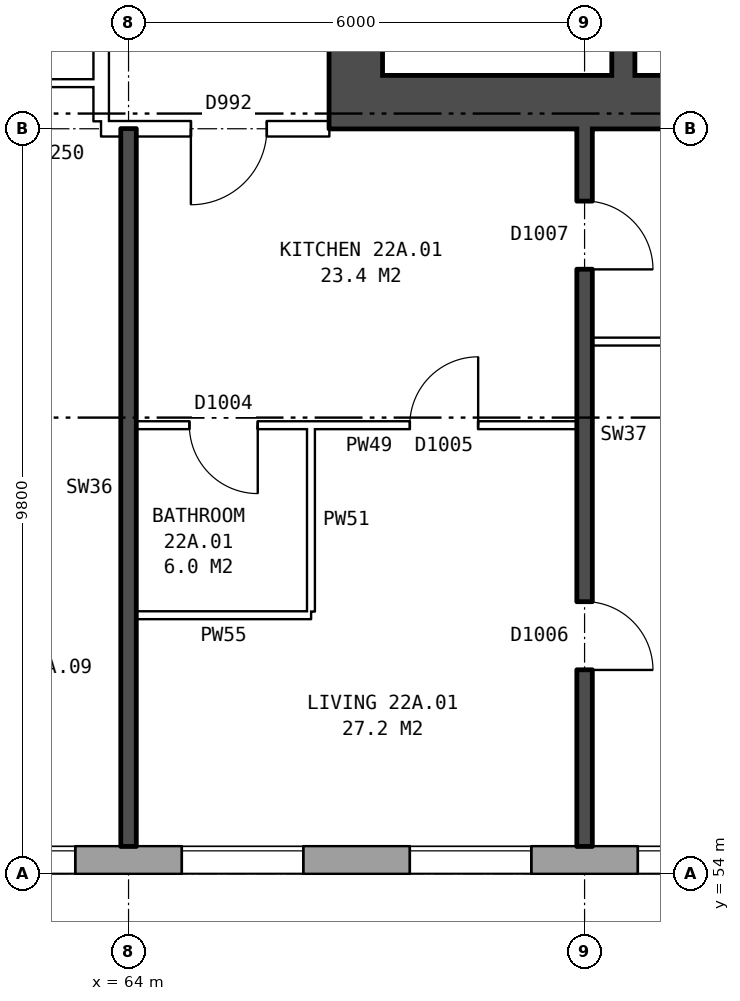
"""IFC4 building model, lengths in metres.
Left out: names, types, materials, properties, quantities, classifications, styles, units other than length and angle.
Written with IfcOpenShell. Run it as: python <this file> out.ifc"""

import sys

from ifc_helpers import new_model, si_unit, direction, frame, frame_2d, origin, place, context, subcontext, project, spatial, rectangle, extrude, element, fill, save


model = new_model("IFC4")
c1 = context("Model", 3, precision=1e-05, world=origin(), true_north=direction((0.0, 1.0)))
c2 = subcontext(c1, "Body", "Model", "MODEL_VIEW")
j1 = project(units=[si_unit("LENGTHUNIT", "METRE"), si_unit("PLANEANGLEUNIT", "RADIAN")], contexts=[c1])
p1 = place(None, origin())
s1 = spatial("IfcSite", under=j1, at=p1, CompositionType="ELEMENT")
p2 = place(p1, origin())
s2 = spatial("IfcBuilding", under=s1, at=p2, CompositionType="ELEMENT")
p3 = place(p2, frame((0.0, 0.0, 80.9)))
s3 = spatial("IfcBuildingStorey", under=s2, at=p3, CompositionType="ELEMENT", Elevation=80.9)
p4 = place(p3, frame((26.325, 54.18, 0.0), z_axis=(0.0, 0.0, 1.0), x_axis=(1.0, 0.0, 0.0)))
e1 = element("IfcWall", 1, at=p4, inside=s3, PredefinedType="STANDARD", context=c2, shape_type="SweptSolid", body=[
    extrude(rectangle(XDim=46.601, YDim=0.36, at=frame_2d((23.3, 0.0))), origin(), (0.0, 0.0, 1.0), 2.85),
])
p5 = place(p4, frame((2.375, 0.0, 0.8)))
e2 = element("IfcOpeningElement", 2, at=p5, cuts=e1, PredefinedType="OPENING", context=c2, shape_type="SweptSolid", body=[
    extrude(rectangle(XDim=1.6, YDim=1.8, at=frame_2d((0.8, 0.9))), frame((0.0, 0.19, 0.0), z_axis=(0.0, -1.0, 0.0), x_axis=(1.0, 0.0, 0.0)), (0.0, 0.0, 1.0), 0.38),
])
p6 = place(p4, frame((5.375, 0.0, 0.8)))
e3 = element("IfcOpeningElement", 3, at=p6, cuts=e1, PredefinedType="OPENING", context=c2, shape_type="SweptSolid", body=[
    extrude(rectangle(XDim=1.6, YDim=1.8, at=frame_2d((0.8, 0.9))), frame((0.0, 0.19, 0.0), z_axis=(0.0, -1.0, 0.0), x_axis=(1.0, 0.0, 0.0)), (0.0, 0.0, 1.0), 0.38),
])
p7 = place(p4, frame((8.375, 0.0, 0.8)))
e4 = element("IfcOpeningElement", 4, at=p7, cuts=e1, PredefinedType="OPENING", context=c2, shape_type="SweptSolid", body=[
    extrude(rectangle(XDim=1.6, YDim=1.8, at=frame_2d((0.8, 0.9))), frame((0.0, 0.19, 0.0), z_axis=(0.0, -1.0, 0.0), x_axis=(1.0, 0.0, 0.0)), (0.0, 0.0, 1.0), 0.38),
])
p8 = place(p4, frame((11.375, 0.0, 0.8)))
e5 = element("IfcOpeningElement", 5, at=p8, cuts=e1, PredefinedType="OPENING", context=c2, shape_type="SweptSolid", body=[
    extrude(rectangle(XDim=1.6, YDim=1.8, at=frame_2d((0.8, 0.9))), frame((0.0, 0.19, 0.0), z_axis=(0.0, -1.0, 0.0), x_axis=(1.0, 0.0, 0.0)), (0.0, 0.0, 1.0), 0.38),
])
p9 = place(p4, frame((15.875, 0.0, 0.8)))
e6 = element("IfcOpeningElement", 6, at=p9, cuts=e1, PredefinedType="OPENING", context=c2, shape_type="SweptSolid", body=[
    extrude(rectangle(XDim=1.2, YDim=1.2, at=frame_2d((0.6, 0.6))), frame((0.0, 0.19, 0.0), z_axis=(0.0, -1.0, 0.0), x_axis=(1.0, 0.0, 0.0)), (0.0, 0.0, 1.0), 0.38),
])
p10 = place(p4, frame((17.375, 0.0, 0.8)))
e7 = element("IfcOpeningElement", 7, at=p10, cuts=e1, PredefinedType="OPENING", context=c2, shape_type="SweptSolid", body=[
    extrude(rectangle(XDim=1.6, YDim=1.8, at=frame_2d((0.8, 0.9))), frame((0.0, 0.19, 0.0), z_axis=(0.0, -1.0, 0.0), x_axis=(1.0, 0.0, 0.0)), (0.0, 0.0, 1.0), 0.38),
])
p11 = place(p4, frame((20.375, 0.0, 0.8)))
e8 = element("IfcOpeningElement", 8, at=p11, cuts=e1, PredefinedType="OPENING", context=c2, shape_type="SweptSolid", body=[
    extrude(rectangle(XDim=1.6, YDim=1.8, at=frame_2d((0.8, 0.9))), frame((0.0, 0.19, 0.0), z_axis=(0.0, -1.0, 0.0), x_axis=(1.0, 0.0, 0.0)), (0.0, 0.0, 1.0), 0.38),
])
p12 = place(p4, frame((23.375, 0.0, 0.8)))
e9 = element("IfcOpeningElement", 9, at=p12, cuts=e1, PredefinedType="OPENING", context=c2, shape_type="SweptSolid", body=[
    extrude(rectangle(XDim=1.6, YDim=1.8, at=frame_2d((0.8, 0.9))), frame((0.0, 0.19, 0.0), z_axis=(0.0, -1.0, 0.0), x_axis=(1.0, 0.0, 0.0)), (0.0, 0.0, 1.0), 0.38),
])
p13 = place(p4, frame((26.375, 0.0, 0.8)))
e10 = element("IfcOpeningElement", 10, at=p13, cuts=e1, PredefinedType="OPENING", context=c2, shape_type="SweptSolid", body=[
    extrude(rectangle(XDim=1.6, YDim=1.8, at=frame_2d((0.8, 0.9))), frame((0.0, 0.19, 0.0), z_axis=(0.0, -1.0, 0.0), x_axis=(1.0, 0.0, 0.0)), (0.0, 0.0, 1.0), 0.38),
])
p14 = place(p4, frame((28.825, 0.0, 0.8)))
e11 = element("IfcOpeningElement", 11, at=p14, cuts=e1, PredefinedType="OPENING", context=c2, shape_type="SweptSolid", body=[
    extrude(rectangle(XDim=1.2, YDim=1.8, at=frame_2d((0.6, 0.9))), frame((0.0, 0.19, 0.0), z_axis=(0.0, -1.0, 0.0), x_axis=(1.0, 0.0, 0.0)), (0.0, 0.0, 1.0), 0.38),
])
p15 = place(p4, frame((32.375, 0.0, 1.7)))
e12 = element("IfcOpeningElement", 12, at=p15, cuts=e1, PredefinedType="OPENING", context=c2, shape_type="SweptSolid", body=[
    extrude(rectangle(XDim=0.8, YDim=0.9, at=frame_2d((0.4, 0.45))), frame((0.0, 0.19, 0.0), z_axis=(0.0, -1.0, 0.0), x_axis=(1.0, 0.0, 0.0)), (0.0, 0.0, 1.0), 0.38),
])
p16 = place(p4, frame((35.375, 0.0, 0.8)))
e13 = element("IfcOpeningElement", 13, at=p16, cuts=e1, PredefinedType="OPENING", context=c2, shape_type="SweptSolid", body=[
    extrude(rectangle(XDim=1.6, YDim=1.8, at=frame_2d((0.8, 0.9))), frame((0.0, 0.19, 0.0), z_axis=(0.0, -1.0, 0.0), x_axis=(1.0, 0.0, 0.0)), (0.0, 0.0, 1.0), 0.38),
])
p17 = place(p4, frame((38.375, 0.0, 0.8)))
e14 = element("IfcOpeningElement", 14, at=p17, cuts=e1, PredefinedType="OPENING", context=c2, shape_type="SweptSolid", body=[
    extrude(rectangle(XDim=1.6, YDim=1.8, at=frame_2d((0.8, 0.9))), frame((0.0, 0.19, 0.0), z_axis=(0.0, -1.0, 0.0), x_axis=(1.0, 0.0, 0.0)), (0.0, 0.0, 1.0), 0.38),
])
p18 = place(p4, frame((41.375, 0.0, 0.8)))
e15 = element("IfcOpeningElement", 15, at=p18, cuts=e1, PredefinedType="OPENING", context=c2, shape_type="SweptSolid", body=[
    extrude(rectangle(XDim=1.6, YDim=1.8, at=frame_2d((0.8, 0.9))), frame((0.0, 0.19, 0.0), z_axis=(0.0, -1.0, 0.0), x_axis=(1.0, 0.0, 0.0)), (0.0, 0.0, 1.0), 0.38),
])
p19 = place(p4, frame((44.375, 0.0, 0.8)))
e16 = element("IfcOpeningElement", 16, at=p19, cuts=e1, PredefinedType="OPENING", context=c2, shape_type="SweptSolid", body=[
    extrude(rectangle(XDim=1.6, YDim=1.8, at=frame_2d((0.8, 0.9))), frame((0.0, 0.19, 0.0), z_axis=(0.0, -1.0, 0.0), x_axis=(1.0, 0.0, 0.0)), (0.0, 0.0, 1.0), 0.38),
])
p20 = place(p4, frame((30.325, 0.0, 0.8)))
e17 = element("IfcOpeningElement", 17, at=p20, cuts=e1, PredefinedType="OPENING", context=c2, shape_type="SweptSolid", body=[
    extrude(rectangle(XDim=0.6, YDim=0.9, at=frame_2d((0.3, 0.45))), frame((0.0, 0.19, 0.0), z_axis=(0.0, -1.0, 0.0), x_axis=(1.0, 0.0, 0.0)), (0.0, 0.0, 1.0), 0.38),
])
p21 = place(p4, frame((33.475, 0.0, 0.8)))
e18 = element("IfcOpeningElement", 18, at=p21, cuts=e1, PredefinedType="OPENING", context=c2, shape_type="SweptSolid", body=[
    extrude(rectangle(XDim=1.0, YDim=1.8, at=frame_2d((0.5, 0.9))), frame((0.0, 0.19, 0.0), z_axis=(0.0, -1.0, 0.0), x_axis=(1.0, 0.0, 0.0)), (0.0, 0.0, 1.0), 0.38),
])
p22 = place(p3, frame((66.99, 64.5, 0.0), z_axis=(0.0, 0.0, 1.0), x_axis=(0.0, 1.0, 0.0)))
e19 = element("IfcWall", 19, at=p22, inside=s3, PredefinedType="SHEAR", context=c2, shape_type="SweptSolid", body=[
    extrude(rectangle(XDim=11.0, YDim=0.7, at=frame_2d((5.5, 0.0))), origin(), (0.0, 0.0, 1.0), 2.85),
])
p23 = place(p22, frame((0.625, 0.0, 0.0)))
e20 = element("IfcOpeningElement", 20, at=p23, cuts=e19, PredefinedType="OPENING", context=c2, shape_type="SweptSolid", body=[
    extrude(rectangle(XDim=1.1, YDim=2.1, at=frame_2d((0.55, 1.05))), frame((0.0, 0.36, 0.0), z_axis=(0.0, -1.0, 0.0), x_axis=(1.0, 0.0, 0.0)), (0.0, 0.0, 1.0), 0.72),
])
p24 = place(p22, frame((9.2, 0.0, 0.0)))
e21 = element("IfcOpeningElement", 21, at=p24, cuts=e19, PredefinedType="OPENING", context=c2, shape_type="SweptSolid", body=[
    extrude(rectangle(XDim=1.1, YDim=2.1, at=frame_2d((0.55, 1.05))), frame((0.0, 0.36, 0.0), z_axis=(0.0, -1.0, 0.0), x_axis=(1.0, 0.0, 0.0)), (0.0, 0.0, 1.0), 0.72),
])
p25 = place(p3, frame((66.64, 64.15, 0.0), z_axis=(0.0, 0.0, 1.0), x_axis=(1.0, 0.0, 0.0)))
e22 = element("IfcWall", 22, at=p25, inside=s3, PredefinedType="SHEAR", context=c2, shape_type="SweptSolid", body=[
    extrude(rectangle(XDim=9.0, YDim=0.7, at=frame_2d((4.5, 0.0))), origin(), (0.0, 0.0, 1.0), 2.85),
])
p26 = place(p3, frame((70.51, 64.5, 0.0), z_axis=(0.0, 0.0, 1.0), x_axis=(0.0, 1.0, 0.0)))
e23 = element("IfcWall", 23, at=p26, inside=s3, PredefinedType="SHEAR", context=c2, shape_type="SweptSolid", body=[
    extrude(rectangle(XDim=2.2, YDim=0.3, at=frame_2d((1.1, 0.0))), origin(), (0.0, 0.0, 1.0), 2.85),
])
p27 = place(p3, frame((63.64, 63.9, 0.0), z_axis=(0.0, 0.0, 1.0), x_axis=(0.0, 1.0, 0.0)))
e24 = element("IfcWall", 24, at=p27, inside=s3, PredefinedType="PARTITIONING", context=c2, shape_type="SweptSolid", body=[
    extrude(rectangle(XDim=12.2, YDim=0.2, at=frame_2d((6.1, 0.0))), origin(), (0.0, 0.0, 1.0), 2.85),
])
p28 = place(p27, frame((5.1, 0.0, 0.0)))
e25 = element("IfcOpeningElement", 25, at=p28, cuts=e24, PredefinedType="OPENING", context=c2, shape_type="SweptSolid", body=[
    extrude(rectangle(XDim=2.0, YDim=2.1, at=frame_2d((1.0, 1.05))), frame((0.0, 0.11, 0.0), z_axis=(0.0, -1.0, 0.0), x_axis=(1.0, 0.0, 0.0)), (0.0, 0.0, 1.0), 0.22),
])
p29 = place(p3, frame((64.1, 57.4, 0.0), z_axis=(0.0, 0.0, 1.0), x_axis=(1.0, 0.0, 0.0)))
e26 = element("IfcWall", 26, at=p29, inside=s3, PredefinedType="PARTITIONING", context=c2, shape_type="SweptSolid", body=[
    extrude(rectangle(XDim=2.3, YDim=0.1, at=frame_2d((1.15, 0.0))), origin(), (0.0, 0.0, 1.0), 2.85),
])
p30 = place(p3, frame((64.1, 59.9, 0.0), z_axis=(0.0, 0.0, 1.0), x_axis=(1.0, 0.0, 0.0)))
e27 = element("IfcWall", 27, at=p30, inside=s3, PredefinedType="PARTITIONING", context=c2, shape_type="SweptSolid", body=[
    extrude(rectangle(XDim=5.8, YDim=0.1, at=frame_2d((2.9, 0.0))), origin(), (0.0, 0.0, 1.0), 2.85),
])
p31 = place(p30, frame((3.6, 0.0, 0.0)))
e28 = element("IfcOpeningElement", 28, at=p31, cuts=e27, PredefinedType="OPENING", context=c2, shape_type="SweptSolid", body=[
    extrude(rectangle(XDim=0.9, YDim=2.1, at=frame_2d((0.45, 1.05))), frame((0.0, 0.06, 0.0), z_axis=(0.0, -1.0, 0.0), x_axis=(1.0, 0.0, 0.0)), (0.0, 0.0, 1.0), 0.12),
])
p32 = place(p30, frame((0.7, 0.0, 0.0)))
e29 = element("IfcOpeningElement", 29, at=p32, cuts=e27, PredefinedType="OPENING", context=c2, shape_type="SweptSolid", body=[
    extrude(rectangle(XDim=0.9, YDim=2.1, at=frame_2d((0.45, 1.05))), frame((0.0, 0.06, 0.0), z_axis=(0.0, -1.0, 0.0), x_axis=(1.0, 0.0, 0.0)), (0.0, 0.0, 1.0), 0.12),
])
p33 = place(p3, frame((70.1, 61.0, 0.0), z_axis=(0.0, 0.0, 1.0), x_axis=(1.0, 0.0, 0.0)))
e30 = element("IfcWall", 30, at=p33, inside=s3, PredefinedType="PARTITIONING", context=c2, shape_type="SweptSolid", body=[
    extrude(rectangle(XDim=5.54, YDim=0.1, at=frame_2d((2.77, 0.0))), origin(), (0.0, 0.0, 1.0), 2.85),
])
p34 = place(p3, frame((63.64, 63.8, 0.0), z_axis=(0.0, 0.0, 1.0), x_axis=(1.0, 0.0, 0.0)))
e31 = element("IfcWall", 31, at=p34, inside=s3, PredefinedType="PARTITIONING", context=c2, shape_type="SweptSolid", body=[
    extrude(rectangle(XDim=3.0, YDim=0.2, at=frame_2d((1.5, 0.0))), origin(), (0.0, 0.0, 1.0), 2.85),
])
p35 = place(p34, frame((1.18, 0.0, 0.0)))
e32 = element("IfcOpeningElement", 32, at=p35, cuts=e31, PredefinedType="OPENING", context=c2, shape_type="SweptSolid", body=[
    extrude(rectangle(XDim=1.0, YDim=2.1, at=frame_2d((0.5, 1.05))), frame((0.0, 0.11, 0.0), z_axis=(0.0, -1.0, 0.0), x_axis=(1.0, 0.0, 0.0)), (0.0, 0.0, 1.0), 0.22),
])
p36 = place(p3, frame((61.0, 64.4, 0.0), z_axis=(0.0, 0.0, 1.0), x_axis=(1.0, 0.0, 0.0)))
e33 = element("IfcWall", 33, at=p36, inside=s3, PredefinedType="PARTITIONING", context=c2, shape_type="SweptSolid", body=[
    extrude(rectangle(XDim=2.64, YDim=0.1, at=frame_2d((1.32, 0.0))), origin(), (0.0, 0.0, 1.0), 2.85),
])
p37 = place(p3, frame((64.0, 54.36, 0.0), z_axis=(0.0, 0.0, 1.0), x_axis=(0.0, 1.0, 0.0)))
e34 = element("IfcWall", 34, at=p37, inside=s3, PredefinedType="SOLIDWALL", context=c2, shape_type="SweptSolid", body=[
    extrude(rectangle(XDim=9.44, YDim=0.2, at=frame_2d((4.72, 0.0))), origin(), (0.0, 0.0, 1.0), 2.85),
])
p38 = place(p3, frame((66.4, 57.45, 0.0), z_axis=(0.0, 0.0, 1.0), x_axis=(0.0, 1.0, 0.0)))
e35 = element("IfcWall", 35, at=p38, inside=s3, PredefinedType="PARTITIONING", context=c2, shape_type="SweptSolid", body=[
    extrude(rectangle(XDim=2.4, YDim=0.1, at=frame_2d((1.2, 0.0))), origin(), (0.0, 0.0, 1.0), 2.85),
])
p39 = place(p3, frame((70.0, 54.36, 0.0), z_axis=(0.0, 0.0, 1.0), x_axis=(0.0, 1.0, 0.0)))
e36 = element("IfcWall", 36, at=p39, inside=s3, PredefinedType="SOLIDWALL", context=c2, shape_type="SweptSolid", body=[
    extrude(rectangle(XDim=9.44, YDim=0.2, at=frame_2d((4.72, 0.0))), origin(), (0.0, 0.0, 1.0), 2.85),
])
p40 = place(p39, frame((2.32, 0.0, 0.0)))
e37 = element("IfcOpeningElement", 37, at=p40, cuts=e36, PredefinedType="OPENING", context=c2, shape_type="SweptSolid", body=[
    extrude(rectangle(XDim=0.9, YDim=2.1, at=frame_2d((0.45, 1.05))), frame((0.0, 0.11, 0.0), z_axis=(0.0, -1.0, 0.0), x_axis=(1.0, 0.0, 0.0)), (0.0, 0.0, 1.0), 0.22),
])
p41 = place(p39, frame((7.59, 0.0, 0.0)))
e38 = element("IfcOpeningElement", 38, at=p41, cuts=e36, PredefinedType="OPENING", context=c2, shape_type="SweptSolid", body=[
    extrude(rectangle(XDim=0.9, YDim=2.1, at=frame_2d((0.45, 1.05))), frame((0.0, 0.11, 0.0), z_axis=(0.0, -1.0, 0.0), x_axis=(1.0, 0.0, 0.0)), (0.0, 0.0, 1.0), 0.22),
])
p42 = place(p16, origin())
e39 = element("IfcWindow", 39, at=p42, inside=s3, PartitioningType="SINGLE_PANEL", PredefinedType="WINDOW", context=c2, shape_type="SweptSolid", body=[
    extrude(rectangle(XDim=1.6, YDim=1.8, at=frame_2d((0.8, 0.9))), frame((0.0, 0.15, 0.0), z_axis=(0.0, -1.0, 0.0), x_axis=(1.0, 0.0, 0.0)), (0.0, 0.0, 1.0), 0.06),
])
fill(e13, e39)
p43 = place(p17, origin())
e40 = element("IfcWindow", 40, at=p43, inside=s3, PartitioningType="SINGLE_PANEL", PredefinedType="WINDOW", context=c2, shape_type="SweptSolid", body=[
    extrude(rectangle(XDim=1.6, YDim=1.8, at=frame_2d((0.8, 0.9))), frame((0.0, 0.15, 0.0), z_axis=(0.0, -1.0, 0.0), x_axis=(1.0, 0.0, 0.0)), (0.0, 0.0, 1.0), 0.06),
])
fill(e14, e40)
p44 = place(p18, origin())
e41 = element("IfcWindow", 41, at=p44, inside=s3, PartitioningType="SINGLE_PANEL", PredefinedType="WINDOW", context=c2, shape_type="SweptSolid", body=[
    extrude(rectangle(XDim=1.6, YDim=1.8, at=frame_2d((0.8, 0.9))), frame((0.0, 0.15, 0.0), z_axis=(0.0, -1.0, 0.0), x_axis=(1.0, 0.0, 0.0)), (0.0, 0.0, 1.0), 0.06),
])
fill(e15, e41)
p45 = place(p19, origin())
e42 = element("IfcWindow", 42, at=p45, inside=s3, PartitioningType="SINGLE_PANEL", PredefinedType="WINDOW", context=c2, shape_type="SweptSolid", body=[
    extrude(rectangle(XDim=1.6, YDim=1.8, at=frame_2d((0.8, 0.9))), frame((0.0, 0.15, 0.0), z_axis=(0.0, -1.0, 0.0), x_axis=(1.0, 0.0, 0.0)), (0.0, 0.0, 1.0), 0.06),
])
fill(e16, e42)
p46 = place(p40, frame((0.9, 0.0, 0.0), z_axis=(0.0, 0.0, 1.0), x_axis=(-1.0, 0.0, 0.0)))
e43 = element("IfcDoor", 43, at=p46, inside=s3, OperationType="SINGLE_SWING_RIGHT", PredefinedType="DOOR", context=c2, shape_type="SweptSolid", body=[
    extrude(rectangle(XDim=0.9, YDim=2.1, at=frame_2d((0.45, 1.05))), frame((0.0, 0.025, 0.0), z_axis=(0.0, -1.0, 0.0), x_axis=(1.0, 0.0, 0.0)), (0.0, 0.0, 1.0), 0.05),
])
fill(e37, e43)
p47 = place(p41, frame((0.9, 0.0, 0.0), z_axis=(0.0, 0.0, 1.0), x_axis=(-1.0, 0.0, 0.0)))
e44 = element("IfcDoor", 44, at=p47, inside=s3, OperationType="SINGLE_SWING_RIGHT", PredefinedType="DOOR", context=c2, shape_type="SweptSolid", body=[
    extrude(rectangle(XDim=0.9, YDim=2.1, at=frame_2d((0.45, 1.05))), frame((0.0, 0.025, 0.0), z_axis=(0.0, -1.0, 0.0), x_axis=(1.0, 0.0, 0.0)), (0.0, 0.0, 1.0), 0.05),
])
fill(e38, e44)
p48 = place(p35, frame((1.0, 0.0, 0.0), z_axis=(0.0, 0.0, 1.0), x_axis=(-1.0, 0.0, 0.0)))
e45 = element("IfcDoor", 45, at=p48, inside=s3, OperationType="SINGLE_SWING_RIGHT", PredefinedType="DOOR", context=c2, shape_type="SweptSolid", body=[
    extrude(rectangle(XDim=1.0, YDim=2.1, at=frame_2d((0.5, 1.05))), frame((0.0, 0.025, 0.0), z_axis=(0.0, -1.0, 0.0), x_axis=(1.0, 0.0, 0.0)), (0.0, 0.0, 1.0), 0.05),
])
fill(e32, e45)
p49 = place(p31, origin())
e46 = element("IfcDoor", 46, at=p49, inside=s3, OperationType="SINGLE_SWING_RIGHT", PredefinedType="DOOR", context=c2, shape_type="SweptSolid", body=[
    extrude(rectangle(XDim=0.9, YDim=2.1, at=frame_2d((0.45, 1.05))), frame((0.0, 0.025, 0.0), z_axis=(0.0, -1.0, 0.0), x_axis=(1.0, 0.0, 0.0)), (0.0, 0.0, 1.0), 0.05),
])
fill(e28, e46)
p50 = place(p32, frame((0.9, 0.0, 0.0), z_axis=(0.0, 0.0, 1.0), x_axis=(-1.0, 0.0, 0.0)))
e47 = element("IfcDoor", 47, at=p50, inside=s3, OperationType="SINGLE_SWING_LEFT", PredefinedType="DOOR", context=c2, shape_type="SweptSolid", body=[
    extrude(rectangle(XDim=0.9, YDim=2.1, at=frame_2d((0.45, 1.05))), frame((0.0, 0.025, 0.0), z_axis=(0.0, -1.0, 0.0), x_axis=(1.0, 0.0, 0.0)), (0.0, 0.0, 1.0), 0.05),
])
fill(e29, e47)
save(model, sys.argv[1])
